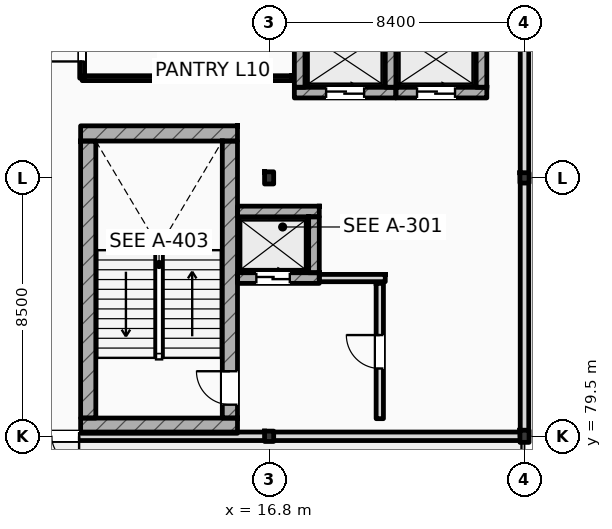
"""IFC4 building model, lengths in metres.
Left out: names, types, materials, properties, quantities, classifications, styles, units other than length and angle.
Written with IfcOpenShell. Run it as: python <this file> out.ifc"""

import sys

from ifc_helpers import new_model, si_unit, direction, frame, frame_2d, origin, origin_2d, place, context, subcontext, project, spatial, rectangle, i_section, extrude, element, fill, save


model = new_model("IFC4")
c1 = context("Model", 3, precision=1e-05, world=origin(), true_north=direction((0.0, 1.0)))
c2 = subcontext(c1, "Body", "Model", "MODEL_VIEW")
j1 = project(units=[si_unit("LENGTHUNIT", "METRE"), si_unit("PLANEANGLEUNIT", "RADIAN")], contexts=[c1])
p1 = place(None, origin())
s1 = spatial("IfcSite", under=j1, at=p1, CompositionType="ELEMENT")
p2 = place(p1, origin())
s2 = spatial("IfcBuilding", under=s1, at=p2, CompositionType="ELEMENT")
p3 = place(p2, frame((0.0, 0.0, 42.6)))
s3 = spatial("IfcBuildingStorey", under=s2, at=p3, CompositionType="ELEMENT", Elevation=42.6)
p4 = place(p3, frame((16.8, 79.5, 0.0), z_axis=(0.0, 0.0, 1.0), x_axis=(1.0, 0.0, 0.0)))
e1 = element("IfcColumn", 1, at=p4, inside=s3, PredefinedType="COLUMN", context=c2, shape_type="SweptSolid", body=[
    extrude(i_section(OverallWidth=0.3, OverallDepth=0.34, WebThickness=0.012, FlangeThickness=0.021, FilletRadius=0.027, at=origin_2d()), origin(), (0.0, 0.0, 1.0), 4.2),
])
for number, where, z_axis, x_axis in (
    (2, (16.8, 88.0, 0.0), (0.0, 0.0, 1.0), (1.0, 0.0, 0.0)),
    (3, (25.2, 79.5, 0.0), (0.0, 0.0, 1.0), (1.0, 0.0, 0.0)),
):
    element("IfcColumn", number, at=place(p3, frame(where, z_axis=z_axis, x_axis=x_axis)), inside=s3, PredefinedType="COLUMN", context=c2, shape_type="SweptSolid", body=[
        extrude(i_section(OverallWidth=0.3, OverallDepth=0.4, WebThickness=0.013, FlangeThickness=0.024, FilletRadius=0.027, at=origin_2d()), origin(), (0.0, 0.0, 1.0), 4.2),
    ])
p5 = place(p3, frame((25.2, 88.0, 0.0), z_axis=(0.0, 0.0, 1.0), x_axis=(1.0, 0.0, 0.0)))
e4 = element("IfcColumn", 4, at=p5, inside=s3, PredefinedType="COLUMN", context=c2, shape_type="SweptSolid", body=[
    extrude(i_section(OverallWidth=0.3, OverallDepth=0.34, WebThickness=0.012, FlangeThickness=0.021, FilletRadius=0.027, at=origin_2d()), origin(), (0.0, 0.0, 1.0), 4.2),
])
for number, where, z_axis, x_axis in (
    (5, (10.6, 89.462, 0.0), (0.0, 0.0, 1.0), (1.0, 0.0, 0.0)),
    (6, (10.6, 79.85, 0.0), (0.0, 0.0, 1.0), (1.0, 0.0, 0.0)),
):
    element("IfcWall", number, at=place(p3, frame(where, z_axis=z_axis, x_axis=x_axis)), inside=s3, PredefinedType="SHEAR", context=c2, shape_type="SweptSolid", body=[
        extrude(rectangle(XDim=5.16, YDim=0.5, at=frame_2d((2.58, 0.0))), origin(), (0.0, 0.0, 1.0), 4.2),
    ])
p6 = place(p3, frame((10.85, 80.1, 0.0), z_axis=(0.0, 0.0, 1.0), x_axis=(0.0, 1.0, 0.0)))
e7 = element("IfcWall", 7, at=p6, inside=s3, PredefinedType="SHEAR", context=c2, shape_type="SweptSolid", body=[
    extrude(rectangle(XDim=9.112, YDim=0.5, at=frame_2d((4.556, 0.0))), origin(), (0.0, 0.0, 1.0), 4.2),
])
p7 = place(p3, frame((15.51, 80.1, 0.0), z_axis=(0.0, 0.0, 1.0), x_axis=(0.0, 1.0, 0.0)))
e8 = element("IfcWall", 8, at=p7, inside=s3, PredefinedType="SHEAR", context=c2, shape_type="SweptSolid", body=[
    extrude(rectangle(XDim=9.112, YDim=0.5, at=frame_2d((4.556, 0.0))), origin(), (0.0, 0.0, 1.0), 4.2),
])
p8 = place(p7, frame((0.44, 0.0, 0.0)))
e9 = element("IfcOpeningElement", 9, at=p8, cuts=e8, PredefinedType="OPENING", context=c2, shape_type="SweptSolid", body=[
    extrude(rectangle(XDim=1.1, YDim=2.2, at=frame_2d((0.55, 1.1))), frame((0.0, 0.26, 0.0), z_axis=(0.0, -1.0, 0.0), x_axis=(1.0, 0.0, 0.0)), (0.0, 0.0, 1.0), 0.52),
])
p9 = place(p3, frame((0.0, 79.5, 0.0), z_axis=(0.0, 0.0, 1.0), x_axis=(1.0, 0.0, 0.0)))
e10 = element("IfcWall", 10, at=p9, inside=s3, PredefinedType="STANDARD", context=c2, shape_type="SweptSolid", body=[
    extrude(rectangle(XDim=25.2, YDim=0.28, at=frame_2d((12.6, 0.0))), origin(), (0.0, 0.0, 1.0), 3.38),
])
p10 = place(p9, frame((8.75, 0.0, 0.0)))
e11 = element("IfcOpeningElement", 11, at=p10, cuts=e10, PredefinedType="OPENING", context=c2, shape_type="SweptSolid", body=[
    extrude(rectangle(XDim=1.8, YDim=2.4, at=frame_2d((0.9, 1.2))), frame((0.0, 0.15, 0.0), z_axis=(0.0, -1.0, 0.0), x_axis=(1.0, 0.0, 0.0)), (0.0, 0.0, 1.0), 0.3),
])
p11 = place(p3, frame((25.2, 79.5, 0.0), z_axis=(0.0, 0.0, 1.0), x_axis=(0.0, 1.0, 0.0)))
e12 = element("IfcWall", 12, at=p11, inside=s3, PredefinedType="STANDARD", context=c2, shape_type="SweptSolid", body=[
    extrude(rectangle(XDim=16.5, YDim=0.28, at=frame_2d((8.25, 0.0))), origin(), (0.0, 0.0, 1.0), 3.57),
])
p12 = place(p3, frame((15.76, 86.895, 0.0), z_axis=(0.0, 0.0, 1.0), x_axis=(1.0, 0.0, 0.0)))
e13 = element("IfcWall", 13, at=p12, inside=s3, PredefinedType="SHEAR", context=c2, shape_type="SweptSolid", body=[
    extrude(rectangle(XDim=2.69, YDim=0.35, at=frame_2d((1.345, 0.0))), origin(), (0.0, 0.0, 1.0), 3.94),
])
p13 = place(p3, frame((15.76, 84.705, 0.0), z_axis=(0.0, 0.0, 1.0), x_axis=(1.0, 0.0, 0.0)))
e14 = element("IfcWall", 14, at=p13, inside=s3, PredefinedType="SHEAR", context=c2, shape_type="SweptSolid", body=[
    extrude(rectangle(XDim=2.69, YDim=0.35, at=frame_2d((1.345, 0.0))), origin(), (0.0, 0.0, 1.0), 3.94),
])
p14 = place(p13, frame((0.62, 0.0, 0.0)))
e15 = element("IfcOpeningElement", 15, at=p14, cuts=e14, PredefinedType="OPENING", context=c2, shape_type="SweptSolid", body=[
    extrude(rectangle(XDim=1.1, YDim=2.2, at=frame_2d((0.55, 1.1))), frame((0.0, 0.185, 0.0), z_axis=(0.0, -1.0, 0.0), x_axis=(1.0, 0.0, 0.0)), (0.0, 0.0, 1.0), 0.37),
])
p15 = place(p3, frame((18.275, 84.88, 0.0), z_axis=(0.0, 0.0, 1.0), x_axis=(0.0, 1.0, 0.0)))
e16 = element("IfcWall", 16, at=p15, inside=s3, PredefinedType="SHEAR", context=c2, shape_type="SweptSolid", body=[
    extrude(rectangle(XDim=1.84, YDim=0.35, at=frame_2d((0.92, 0.0))), origin(), (0.0, 0.0, 1.0), 3.94),
])
p16 = place(p3, frame((17.63, 90.805, 0.0), z_axis=(0.0, 0.0, 1.0), x_axis=(1.0, 0.0, 0.0)))
e17 = element("IfcWall", 17, at=p16, inside=s3, PredefinedType="SHEAR", context=c2, shape_type="SweptSolid", body=[
    extrude(rectangle(XDim=3.34, YDim=0.35, at=frame_2d((1.67, 0.0))), origin(), (0.0, 0.0, 1.0), 3.94),
])
p17 = place(p16, frame((1.045, 0.0, 0.0)))
e18 = element("IfcOpeningElement", 18, at=p17, cuts=e17, PredefinedType="OPENING", context=c2, shape_type="SweptSolid", body=[
    extrude(rectangle(XDim=1.25, YDim=2.25, at=frame_2d((0.625, 1.125))), frame((0.0, 0.185, 0.0), z_axis=(0.0, -1.0, 0.0), x_axis=(1.0, 0.0, 0.0)), (0.0, 0.0, 1.0), 0.37),
])
for number, where, z_axis, x_axis in (
    (19, (17.805, 90.98, 0.0), (0.0, 0.0, 1.0), (0.0, 1.0, 0.0)),
    (20, (20.795, 90.98, 0.0), (0.0, 0.0, 1.0), (0.0, 1.0, 0.0)),
):
    element("IfcWall", number, at=place(p3, frame(where, z_axis=z_axis, x_axis=x_axis)), inside=s3, PredefinedType="SHEAR", context=c2, shape_type="SweptSolid", body=[
        extrude(rectangle(XDim=1.84, YDim=0.35, at=frame_2d((0.92, 0.0))), origin(), (0.0, 0.0, 1.0), 3.94),
    ])
p18 = place(p3, frame((20.97, 90.805, 0.0), z_axis=(0.0, 0.0, 1.0), x_axis=(1.0, 0.0, 0.0)))
e21 = element("IfcWall", 21, at=p18, inside=s3, PredefinedType="SHEAR", context=c2, shape_type="SweptSolid", body=[
    extrude(rectangle(XDim=2.99, YDim=0.35, at=frame_2d((1.495, 0.0))), origin(), (0.0, 0.0, 1.0), 3.94),
])
p19 = place(p18, frame((0.695, 0.0, 0.0)))
e22 = element("IfcOpeningElement", 22, at=p19, cuts=e21, PredefinedType="OPENING", context=c2, shape_type="SweptSolid", body=[
    extrude(rectangle(XDim=1.25, YDim=2.25, at=frame_2d((0.625, 1.125))), frame((0.0, 0.185, 0.0), z_axis=(0.0, -1.0, 0.0), x_axis=(1.0, 0.0, 0.0)), (0.0, 0.0, 1.0), 0.37),
])
p20 = place(p3, frame((23.785, 90.98, 0.0), z_axis=(0.0, 0.0, 1.0), x_axis=(0.0, 1.0, 0.0)))
e23 = element("IfcWall", 23, at=p20, inside=s3, PredefinedType="SHEAR", context=c2, shape_type="SweptSolid", body=[
    extrude(rectangle(XDim=1.84, YDim=0.35, at=frame_2d((0.92, 0.0))), origin(), (0.0, 0.0, 1.0), 3.94),
])
p21 = place(p3, frame((18.45, 84.705, 0.0), z_axis=(0.0, 0.0, 1.0), x_axis=(1.0, 0.0, 0.0)))
e24 = element("IfcWall", 24, at=p21, inside=s3, PredefinedType="STANDARD", context=c2, shape_type="SweptSolid", body=[
    extrude(rectangle(XDim=2.17, YDim=0.24, at=frame_2d((1.085, 0.0))), origin(), (0.0, 0.0, 1.0), 3.94),
])
p22 = place(p3, frame((20.44, 80.08, 0.0), z_axis=(0.0, 0.0, 1.0), x_axis=(0.0, 1.0, 0.0)))
e25 = element("IfcWall", 25, at=p22, inside=s3, PredefinedType="STANDARD", context=c2, shape_type="SweptSolid", body=[
    extrude(rectangle(XDim=4.45, YDim=0.24, at=frame_2d((2.225, 0.0))), origin(), (0.0, 0.0, 1.0), 3.94),
])
p23 = place(p22, frame((1.65, 0.0, 0.0)))
e26 = element("IfcOpeningElement", 26, at=p23, cuts=e25, PredefinedType="OPENING", context=c2, shape_type="SweptSolid", body=[
    extrude(rectangle(XDim=1.1, YDim=2.2, at=frame_2d((0.55, 1.1))), frame((0.0, 0.13, 0.0), z_axis=(0.0, -1.0, 0.0), x_axis=(1.0, 0.0, 0.0)), (0.0, 0.0, 1.0), 0.26),
])
p24 = place(p3, frame((10.65, 91.28, 0.0), z_axis=(0.0, 0.0, 1.0), x_axis=(0.0, 1.0, 0.0)))
e27 = element("IfcWall", 27, at=p24, inside=s3, PredefinedType="PARTITIONING", context=c2, shape_type="SweptSolid", body=[
    extrude(rectangle(XDim=4.58, YDim=0.16, at=frame_2d((2.29, 0.0))), origin(), (0.0, 0.0, 1.0), 3.94),
])
p25 = place(p24, frame((0.55, 0.0, 0.0)))
e28 = element("IfcOpeningElement", 28, at=p25, cuts=e27, PredefinedType="OPENING", context=c2, shape_type="SweptSolid", body=[
    extrude(rectangle(XDim=1.05, YDim=2.12, at=frame_2d((0.525, 1.06))), frame((0.0, 0.09, 0.0), z_axis=(0.0, -1.0, 0.0), x_axis=(1.0, 0.0, 0.0)), (0.0, 0.0, 1.0), 0.18),
])
p26 = place(p24, frame((2.75, 0.0, 0.0)))
e29 = element("IfcOpeningElement", 29, at=p26, cuts=e27, PredefinedType="OPENING", context=c2, shape_type="SweptSolid", body=[
    extrude(rectangle(XDim=0.94, YDim=2.15, at=frame_2d((0.47, 1.075))), frame((0.0, 0.09, 0.0), z_axis=(0.0, -1.0, 0.0), x_axis=(1.0, 0.0, 0.0)), (0.0, 0.0, 1.0), 0.18),
])
p27 = place(p3, frame((10.65, 91.28, 0.0), z_axis=(0.0, 0.0, 1.0), x_axis=(1.0, 0.0, 0.0)))
e30 = element("IfcWall", 30, at=p27, inside=s3, PredefinedType="PARTITIONING", context=c2, shape_type="SweptSolid", body=[
    extrude(rectangle(XDim=6.9, YDim=0.16, at=frame_2d((3.45, 0.0))), origin(), (0.0, 0.0, 1.0), 3.94),
])
p28 = place(p10, frame((1.8, 0.0, 0.0), z_axis=(0.0, 0.0, 1.0), x_axis=(-1.0, 0.0, 0.0)))
e31 = element("IfcDoor", 31, at=p28, inside=s3, OperationType="DOUBLE_SWING_LEFT", PredefinedType="DOOR", context=c2, shape_type="SweptSolid", body=[
    extrude(rectangle(XDim=1.8, YDim=2.4, at=frame_2d((0.9, 1.2))), frame((0.0, 0.025, 0.0), z_axis=(0.0, -1.0, 0.0), x_axis=(1.0, 0.0, 0.0)), (0.0, 0.0, 1.0), 0.05),
])
fill(e11, e31)
p29 = place(p8, origin())
e32 = element("IfcDoor", 32, at=p29, inside=s3, OperationType="SINGLE_SWING_RIGHT", PredefinedType="DOOR", context=c2, shape_type="SweptSolid", body=[
    extrude(rectangle(XDim=1.1, YDim=2.2, at=frame_2d((0.55, 1.1))), frame((0.0, 0.025, 0.0), z_axis=(0.0, -1.0, 0.0), x_axis=(1.0, 0.0, 0.0)), (0.0, 0.0, 1.0), 0.05),
])
fill(e9, e32)
p30 = place(p14, origin())
e33 = element("IfcDoor", 33, at=p30, inside=s3, OperationType="SLIDING_TO_LEFT", PredefinedType="DOOR", context=c2, shape_type="SweptSolid", body=[
    extrude(rectangle(XDim=1.1, YDim=2.2, at=frame_2d((0.55, 1.1))), frame((0.0, 0.025, 0.0), z_axis=(0.0, -1.0, 0.0), x_axis=(1.0, 0.0, 0.0)), (0.0, 0.0, 1.0), 0.05),
])
fill(e15, e33)
p31 = place(p17, origin())
e34 = element("IfcDoor", 34, at=p31, inside=s3, OperationType="SLIDING_TO_LEFT", PredefinedType="DOOR", context=c2, shape_type="SweptSolid", body=[
    extrude(rectangle(XDim=1.25, YDim=2.25, at=frame_2d((0.625, 1.125))), frame((0.0, 0.025, 0.0), z_axis=(0.0, -1.0, 0.0), x_axis=(1.0, 0.0, 0.0)), (0.0, 0.0, 1.0), 0.05),
])
fill(e18, e34)
p32 = place(p19, origin())
e35 = element("IfcDoor", 35, at=p32, inside=s3, OperationType="SLIDING_TO_LEFT", PredefinedType="DOOR", context=c2, shape_type="SweptSolid", body=[
    extrude(rectangle(XDim=1.25, YDim=2.25, at=frame_2d((0.625, 1.125))), frame((0.0, 0.025, 0.0), z_axis=(0.0, -1.0, 0.0), x_axis=(1.0, 0.0, 0.0)), (0.0, 0.0, 1.0), 0.05),
])
fill(e22, e35)
p33 = place(p23, origin())
e36 = element("IfcDoor", 36, at=p33, inside=s3, OperationType="SINGLE_SWING_RIGHT", PredefinedType="DOOR", context=c2, shape_type="SweptSolid", body=[
    extrude(rectangle(XDim=1.1, YDim=2.2, at=frame_2d((0.55, 1.1))), frame((0.0, 0.025, 0.0), z_axis=(0.0, -1.0, 0.0), x_axis=(1.0, 0.0, 0.0)), (0.0, 0.0, 1.0), 0.05),
])
fill(e26, e36)
p34 = place(p25, origin())
e37 = element("IfcDoor", 37, at=p34, inside=s3, OperationType="SINGLE_SWING_LEFT", PredefinedType="DOOR", context=c2, shape_type="SweptSolid", body=[
    extrude(rectangle(XDim=1.05, YDim=2.12, at=frame_2d((0.525, 1.06))), frame((0.0, 0.025, 0.0), z_axis=(0.0, -1.0, 0.0), x_axis=(1.0, 0.0, 0.0)), (0.0, 0.0, 1.0), 0.05),
])
fill(e28, e37)
save(model, sys.argv[1])
